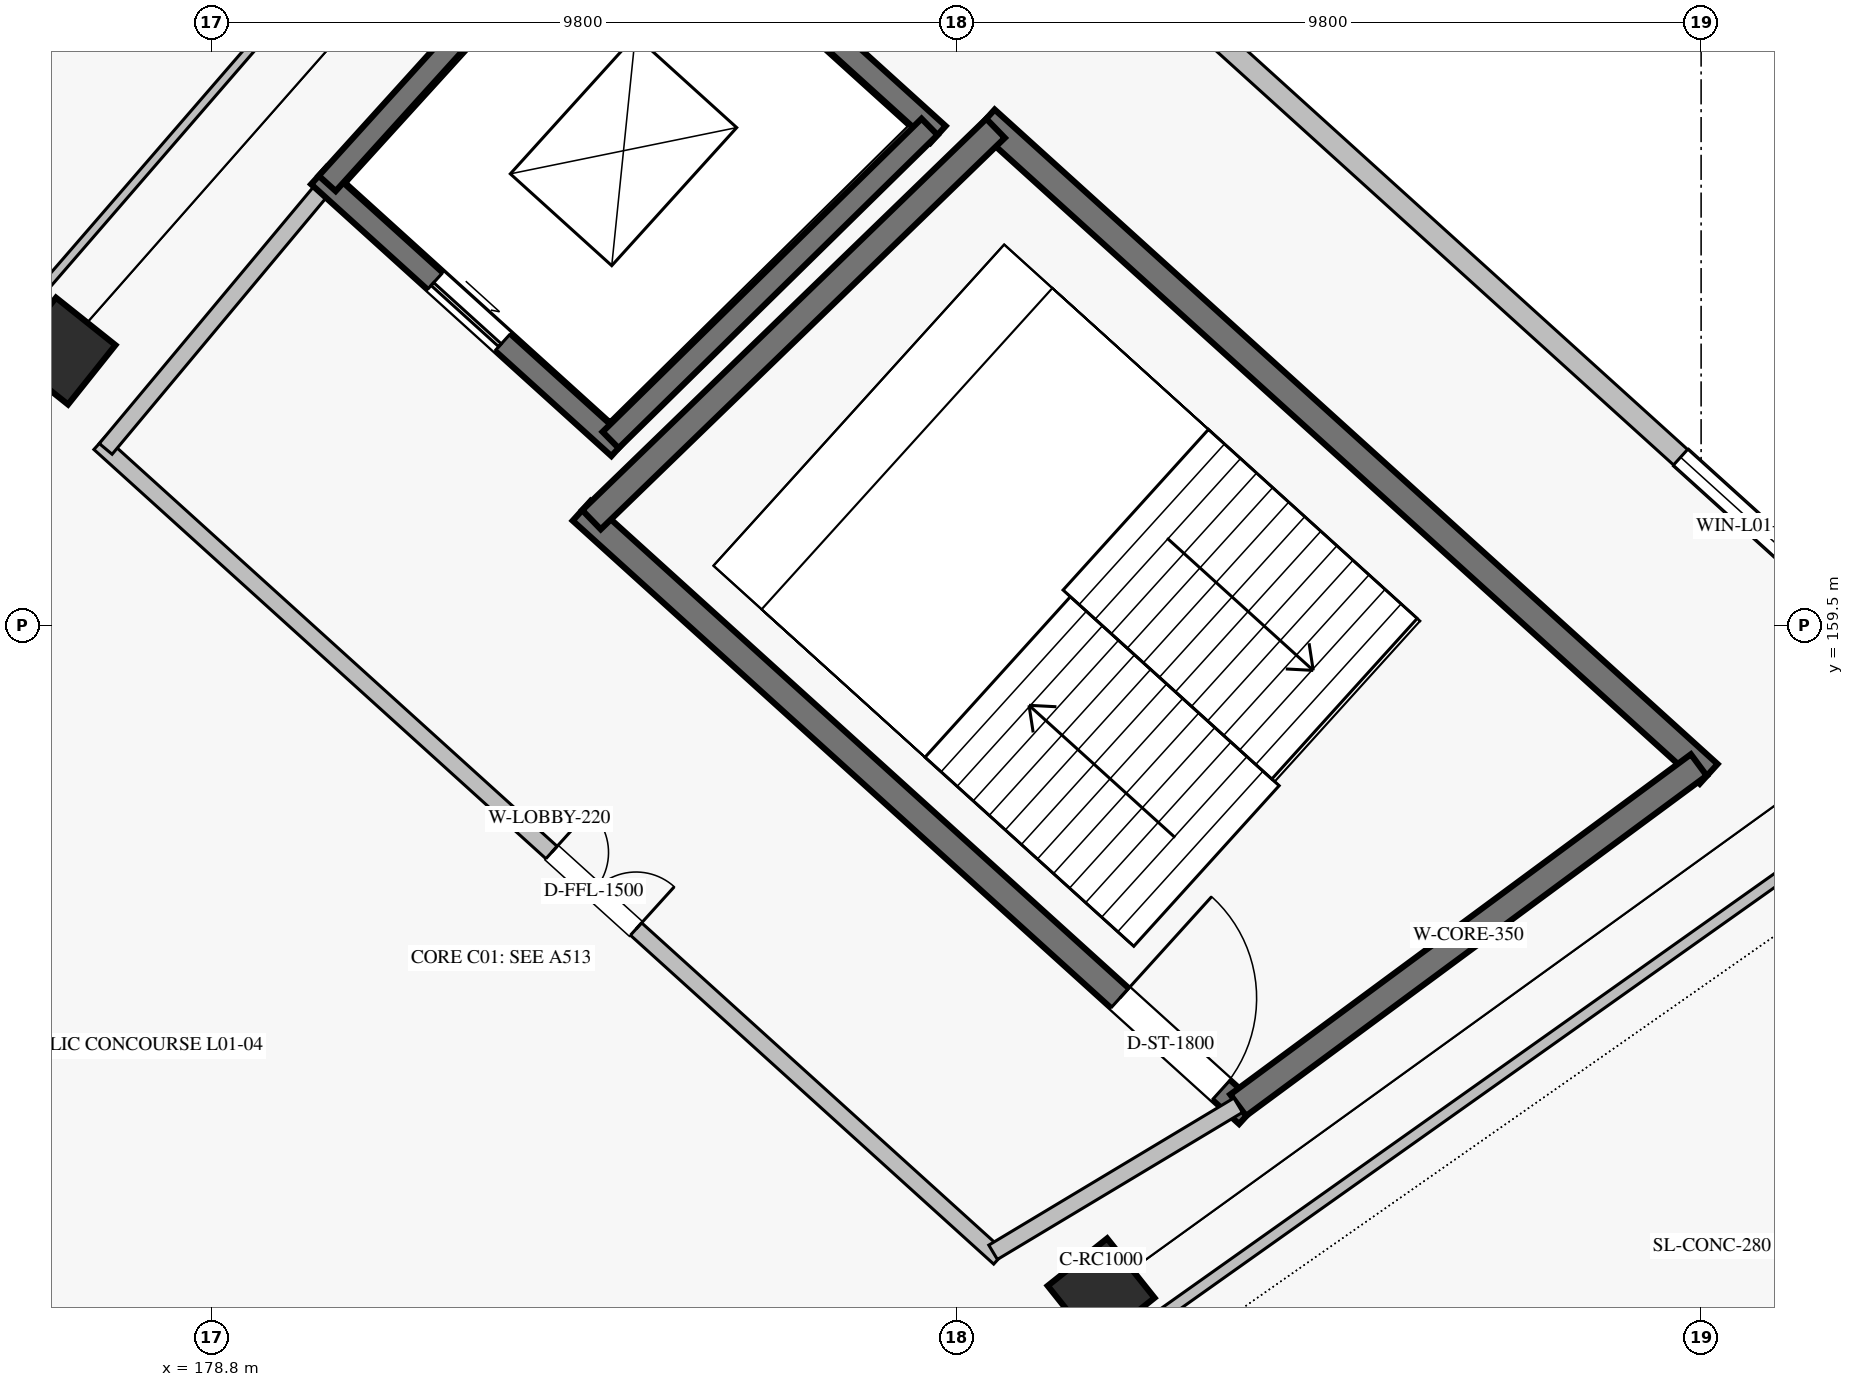
"""IFC4 building model, lengths in metres.
Left out: names, types, materials, properties, quantities, classifications, styles, units other than length and angle.
Written with IfcOpenShell. Run it as: python <this file> out.ifc"""

import sys

from ifc_helpers import new_model, si_unit, direction, frame, frame_2d, origin, origin_2d, place, context, subcontext, project, spatial, rectangle, extrude, element, fill, save


model = new_model("IFC4")
c1 = context("Model", 3, precision=1e-05, world=origin(), true_north=direction((0.0, 1.0)))
c2 = subcontext(c1, "Body", "Model", "MODEL_VIEW")
j1 = project(units=[si_unit("LENGTHUNIT", "METRE"), si_unit("PLANEANGLEUNIT", "RADIAN")], contexts=[c1])
p1 = place(None, origin())
s1 = spatial("IfcSite", under=j1, at=p1, CompositionType="ELEMENT")
p2 = place(p1, origin())
s2 = spatial("IfcBuilding", under=s1, at=p2, CompositionType="ELEMENT")
p3 = place(p2, frame((0.0, 0.0, 5.78)))
s3 = spatial("IfcBuildingStorey", under=s2, at=p3, CompositionType="ELEMENT", Elevation=5.78)
for number, where, z_axis, x_axis in (
    (1, (190.506, 150.734, 0.0), (0.0, 0.0, 1.0), (0.782, 0.623, 0.0)),
    (2, (176.834, 163.111, 0.0), (0.0, 0.0, 1.0), (0.623, 0.782, 0.0)),
):
    element("IfcColumn", number, at=place(p3, frame(where, z_axis=z_axis, x_axis=x_axis)), inside=s3, PredefinedType="COLUMN", context=c2, shape_type="SweptSolid", body=[
        extrude(rectangle(XDim=1.0, YDim=1.0, at=origin_2d()), origin(), (0.0, 0.0, 1.0), 4.76),
    ])
p4 = place(p3, frame((201.169, 158.963, 0.0), z_axis=(0.0, 0.0, 1.0), x_axis=(-0.741352367697, 0.671115986183, 0.0)))
e3 = element("IfcWall", 3, at=p4, inside=s3, PredefinedType="SOLIDWALL", context=c2, shape_type="SweptSolid", body=[
    extrude(rectangle(XDim=20.564, YDim=0.275, at=frame_2d((10.282, 0.0))), origin(), (0.0, 0.0, 1.0), 3.798),
])
p5 = place(p4, frame((1.4, 0.0, 1.0)))
e4 = element("IfcOpeningElement", 4, at=p5, cuts=e3, PredefinedType="OPENING", context=c2, shape_type="SweptSolid", body=[
    extrude(rectangle(XDim=2.7, YDim=1.9, at=frame_2d((1.35, 0.95))), frame((0.0, 0.147, 0.0), z_axis=(0.0, -1.0, 0.0), x_axis=(1.0, 0.0, 0.0)), (0.0, 0.0, 1.0), 0.295),
])
p6 = place(p3, frame((192.439, 153.072, 0.0), z_axis=(0.0, 0.0, 1.0), x_axis=(-0.741358227035, 0.671109513572, 0.0)))
e5 = element("IfcWall", 5, at=p6, inside=s3, PredefinedType="SHEAR", context=c2, shape_type="SweptSolid", body=[
    extrude(rectangle(XDim=11.827, YDim=0.35, at=frame_2d((5.913, 0.0))), origin(), (0.0, 0.0, 1.0), 4.5),
])
p7 = place(p6, frame((0.475, 0.0, 0.0)))
e6 = element("IfcOpeningElement", 6, at=p7, cuts=e5, PredefinedType="OPENING", context=c2, shape_type="SweptSolid", body=[
    extrude(rectangle(XDim=1.8, YDim=2.2, at=frame_2d((0.9, 1.1))), frame((0.0, 0.185, 0.0), z_axis=(0.0, -1.0, 0.0), x_axis=(1.0, 0.0, 0.0)), (0.0, 0.0, 1.0), 0.37),
])
p8 = place(p3, frame((198.499, 157.548, 0.0), z_axis=(0.0, 0.0, 1.0), x_axis=(-0.741351373721, 0.671117084183, 0.0)))
e7 = element("IfcWall", 7, at=p8, inside=s3, PredefinedType="SHEAR", context=c2, shape_type="SweptSolid", body=[
    extrude(rectangle(XDim=12.83, YDim=0.35, at=frame_2d((6.415, 0.0))), origin(), (0.0, 0.0, 1.0), 4.5),
])
p9 = place(p3, frame((192.309, 153.189, 0.0), z_axis=(0.0, 0.0, 1.0), x_axis=(0.804395625347, 0.594093997548, 0.0)))
e8 = element("IfcWall", 8, at=p9, inside=s3, PredefinedType="SHEAR", context=c2, shape_type="SweptSolid", body=[
    extrude(rectangle(XDim=7.534, YDim=0.35, at=frame_2d((3.767, 0.0))), origin(), (0.0, 0.0, 1.0), 4.5),
])
p10 = place(p3, frame((183.801, 160.892, 0.0), z_axis=(0.0, 0.0, 1.0), x_axis=(0.718297398554, 0.69573619083, 0.0)))
e9 = element("IfcWall", 9, at=p10, inside=s3, PredefinedType="SHEAR", context=c2, shape_type="SweptSolid", body=[
    extrude(rectangle(XDim=7.402, YDim=0.35, at=frame_2d((3.701, 0.0))), origin(), (0.0, 0.0, 1.0), 4.5),
])
p11 = place(p3, frame((184.163, 161.841, 0.0), z_axis=(0.0, 0.0, 1.0), x_axis=(-0.741350155641, 0.671118429736, 0.0)))
e10 = element("IfcWall", 10, at=p11, inside=s3, PredefinedType="SHEAR", context=c2, shape_type="SweptSolid", body=[
    extrude(rectangle(XDim=5.329, YDim=0.3, at=frame_2d((2.665, 0.0))), origin(), (0.0, 0.0, 1.0), 4.5),
])
p12 = place(p11, frame((2.065, 0.0, 0.0)))
e11 = element("IfcOpeningElement", 11, at=p12, cuts=e10, PredefinedType="OPENING", context=c2, shape_type="SweptSolid", body=[
    extrude(rectangle(XDim=1.2, YDim=2.2, at=frame_2d((0.6, 1.1))), frame((0.0, 0.16, 0.0), z_axis=(0.0, -1.0, 0.0), x_axis=(1.0, 0.0, 0.0)), (0.0, 0.0, 1.0), 0.32),
])
p13 = place(p3, frame((188.36, 165.961, 0.0), z_axis=(0.0, 0.0, 1.0), x_axis=(-0.74134208775, 0.671127341815, 0.0)))
e12 = element("IfcWall", 12, at=p13, inside=s3, PredefinedType="SHEAR", context=c2, shape_type="SweptSolid", body=[
    extrude(rectangle(XDim=5.675, YDim=0.3, at=frame_2d((2.837, 0.0))), origin(), (0.0, 0.0, 1.0), 4.5),
])
p14 = place(p3, frame((184.052, 161.941, 0.0), z_axis=(0.0, 0.0, 1.0), x_axis=(0.713553028001, 0.700601224828, 0.0)))
e13 = element("IfcWall", 13, at=p14, inside=s3, PredefinedType="SHEAR", context=c2, shape_type="SweptSolid", body=[
    extrude(rectangle(XDim=5.881, YDim=0.3, at=frame_2d((2.94, 0.0))), origin(), (0.0, 0.0, 1.0), 4.5),
])
p15 = place(p3, frame((180.324, 165.316, 0.0), z_axis=(0.0, 0.0, 1.0), x_axis=(0.67115829282, 0.741314067031, 0.0)))
e14 = element("IfcWall", 14, at=p15, inside=s3, PredefinedType="SHEAR", context=c2, shape_type="SweptSolid", body=[
    extrude(rectangle(XDim=5.871, YDim=0.3, at=frame_2d((2.935, 0.0))), origin(), (0.0, 0.0, 1.0), 4.5),
])
p16 = place(p3, frame((189.166, 151.181, 0.0), z_axis=(0.0, 0.0, 1.0), x_axis=(-0.741351035574, 0.671117457717, 0.0)))
e15 = element("IfcWall", 15, at=p16, inside=s3, PredefinedType="SOLIDWALL", context=c2, shape_type="SweptSolid", body=[
    extrude(rectangle(XDim=15.969, YDim=0.22, at=frame_2d((7.985, 0.0))), origin(), (0.0, 0.0, 1.0), 4.5),
])
p17 = place(p16, frame((6.447, 0.0, 0.0)))
e16 = element("IfcOpeningElement", 16, at=p17, cuts=e15, PredefinedType="OPENING", context=c2, shape_type="SweptSolid", body=[
    extrude(rectangle(XDim=1.5, YDim=2.2, at=frame_2d((0.75, 1.1))), frame((0.0, 0.12, 0.0), z_axis=(0.0, -1.0, 0.0), x_axis=(1.0, 0.0, 0.0)), (0.0, 0.0, 1.0), 0.24),
])
p18 = place(p3, frame((189.085, 151.254, 0.0), z_axis=(0.0, 0.0, 1.0), x_axis=(0.857424171966, 0.514610327654, 0.0)))
e17 = element("IfcWall", 17, at=p18, inside=s3, PredefinedType="SOLIDWALL", context=c2, shape_type="SweptSolid", body=[
    extrude(rectangle(XDim=3.76, YDim=0.22, at=frame_2d((1.88, 0.0))), origin(), (0.0, 0.0, 1.0), 4.5),
])
p19 = place(p3, frame((177.409, 161.824, 0.0), z_axis=(0.0, 0.0, 1.0), x_axis=(0.640759627034, 0.767741558315, 0.0)))
e18 = element("IfcWall", 18, at=p19, inside=s3, PredefinedType="SOLIDWALL", context=c2, shape_type="SweptSolid", body=[
    extrude(rectangle(XDim=4.549, YDim=0.22, at=frame_2d((2.274, 0.0))), origin(), (0.0, 0.0, 1.0), 4.5),
])
p20 = place(p3, frame((191.179, 150.342, 0.0), z_axis=(0.0, 0.0, 1.0), x_axis=(0.815753527099, 0.578399674122, 0.0)))
e19 = element("IfcWall", 19, at=p20, inside=s3, PredefinedType="PARTITIONING", context=c2, shape_type="SweptSolid", body=[
    extrude(rectangle(XDim=12.382, YDim=0.15, at=frame_2d((6.191, 0.0))), origin(), (0.0, 0.0, 1.0), 3.82),
])
p21 = place(p3, frame((176.401, 163.72, 0.0), z_axis=(0.0, 0.0, 1.0), x_axis=(0.654293035882, 0.756241114458, 0.0)))
e20 = element("IfcWall", 20, at=p21, inside=s3, PredefinedType="PARTITIONING", context=c2, shape_type="SweptSolid", body=[
    extrude(rectangle(XDim=12.091, YDim=0.115, at=frame_2d((6.045, 0.0))), origin(), (0.0, 0.0, 1.0), 3.82),
])
p22 = place(p3, frame((170.674, 166.441, 0.0), z_axis=(0.0, 0.0, 1.0), x_axis=(0.594760374645, 0.803903039397, 0.0)))
e21 = element("IfcWall", 21, at=p22, inside=s3, PredefinedType="PARTITIONING", context=c2, shape_type="SweptSolid", body=[
    extrude(rectangle(XDim=11.875, YDim=0.1, at=frame_2d((5.938, 0.0))), origin(), (0.0, 0.0, 1.0), 3.82),
])
p23 = place(p5, origin())
e22 = element("IfcWindow", 22, at=p23, inside=s3, PartitioningType="SINGLE_PANEL", PredefinedType="WINDOW", context=c2, shape_type="SweptSolid", body=[
    extrude(rectangle(XDim=2.7, YDim=1.9, at=frame_2d((1.35, 0.95))), frame((0.0, 0.03, 0.0), z_axis=(0.0, -1.0, 0.0), x_axis=(1.0, 0.0, 0.0)), (0.0, 0.0, 1.0), 0.06),
])
fill(e4, e22)
p24 = place(p7, frame((1.8, 0.0, 0.0), z_axis=(0.0, 0.0, 1.0), x_axis=(-1.0, 0.0, 0.0)))
e23 = element("IfcDoor", 23, at=p24, inside=s3, OperationType="SINGLE_SWING_LEFT", PredefinedType="DOOR", context=c2, shape_type="SweptSolid", body=[
    extrude(rectangle(XDim=1.8, YDim=2.2, at=frame_2d((0.9, 1.1))), frame((0.0, 0.025, 0.0), z_axis=(0.0, -1.0, 0.0), x_axis=(1.0, 0.0, 0.0)), (0.0, 0.0, 1.0), 0.05),
])
fill(e6, e23)
p25 = place(p12, origin())
e24 = element("IfcDoor", 24, at=p25, inside=s3, OperationType="SLIDING_TO_LEFT", PredefinedType="DOOR", context=c2, shape_type="SweptSolid", body=[
    extrude(rectangle(XDim=1.2, YDim=2.2, at=frame_2d((0.6, 1.1))), frame((0.0, 0.025, 0.0), z_axis=(0.0, -1.0, 0.0), x_axis=(1.0, 0.0, 0.0)), (0.0, 0.0, 1.0), 0.05),
])
fill(e11, e24)
p26 = place(p17, frame((1.5, 0.0, 0.0), z_axis=(0.0, 0.0, 1.0), x_axis=(-1.0, 0.0, 0.0)))
e25 = element("IfcDoor", 25, at=p26, inside=s3, OperationType="DOUBLE_DOOR_SINGLE_SWING", PredefinedType="DOOR", context=c2, shape_type="SweptSolid", body=[
    extrude(rectangle(XDim=1.5, YDim=2.2, at=frame_2d((0.75, 1.1))), frame((0.0, 0.025, 0.0), z_axis=(0.0, -1.0, 0.0), x_axis=(1.0, 0.0, 0.0)), (0.0, 0.0, 1.0), 0.05),
])
fill(e16, e25)
save(model, sys.argv[1])
